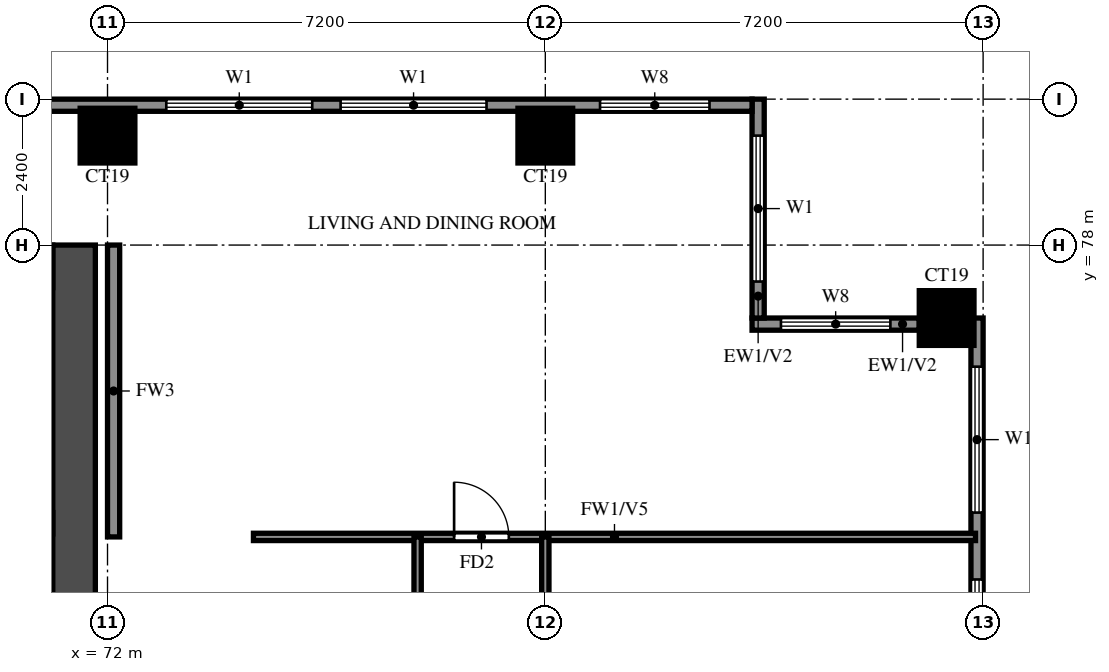
"""IFC4 building model, lengths in metres.
Left out: names, types, materials, properties, quantities, classifications, styles, units other than length and angle.
Written with IfcOpenShell. Run it as: python <this file> out.ifc"""

import sys

from ifc_helpers import new_model, si_unit, direction, frame, frame_2d, origin, origin_2d, place, context, subcontext, project, spatial, rectangle, extrude, source, transform, mapped, element, fill, save


model = new_model("IFC4")
c1 = context("Model", 3, precision=1e-05, world=origin(), true_north=direction((0.0, 1.0)))
c2 = subcontext(c1, "Body", "Model", "MODEL_VIEW")
j1 = project(units=[si_unit("LENGTHUNIT", "METRE"), si_unit("PLANEANGLEUNIT", "RADIAN")], contexts=[c1])
p1 = place(None, origin())
s1 = spatial("IfcSite", under=j1, at=p1, CompositionType="ELEMENT")
p2 = place(p1, origin())
s2 = spatial("IfcBuilding", under=s1, at=p2, CompositionType="ELEMENT")
p3 = place(p2, frame((0.0, 0.0, 123.5)))
s3 = spatial("IfcBuildingStorey", under=s2, at=p3, CompositionType="ELEMENT", Elevation=123.5)
m1 = source(origin(), c2, "Body", "SweptSolid", [
    extrude(rectangle(XDim=0.9, YDim=0.9, at=origin_2d()), origin(), (0.0, 0.0, 1.0), 3.2),
])
for number, where, z_axis, x_axis in (
    (1, (85.8, 76.8, 0.0), (0.0, 0.0, 1.0), (1.0, 0.0, 0.0)),
    (2, (72.0, 79.8, 0.0), (0.0, 0.0, 1.0), (1.0, 0.0, 0.0)),
    (3, (79.2, 79.8, 0.0), (0.0, 0.0, 1.0), (1.0, 0.0, 0.0)),
):
    element("IfcColumn", number, at=place(p3, frame(where, z_axis=z_axis, x_axis=x_axis)), inside=s3, PredefinedType="COLUMN", context=c2, shape_type="MappedRepresentation", body=[
        mapped(m1, transform((0.0, 0.0, 0.0))),
    ])
p4 = place(p3, frame((71.45, 66.1, 0.0), z_axis=(0.0, 0.0, 1.0), x_axis=(0.0, 1.0, 0.0)))
e4 = element("IfcWall", 4, at=p4, inside=s3, PredefinedType="SHEAR", context=c2, shape_type="SweptSolid", body=[
    extrude(rectangle(XDim=11.9, YDim=0.7, at=frame_2d((5.95, 0.0))), origin(), (0.0, 0.0, 1.0), 3.2),
])
p5 = place(p3, frame((29.7, 77.65, 0.0), z_axis=(0.0, 0.0, 1.0), x_axis=(1.0, 0.0, 0.0)))
e5 = element("IfcWall", 5, at=p5, inside=s3, PredefinedType="SHEAR", context=c2, shape_type="SweptSolid", body=[
    extrude(rectangle(XDim=41.4, YDim=0.7, at=frame_2d((20.7, 0.0))), origin(), (0.0, 0.0, 1.0), 3.2),
])
p6 = place(p3, frame((86.3, 62.4, 0.0), z_axis=(0.0, 0.0, 1.0), x_axis=(0.0, 1.0, 0.0)))
e6 = element("IfcWall", 6, at=p6, inside=s3, PredefinedType="SOLIDWALL", context=c2, shape_type="SweptSolid", body=[
    extrude(rectangle(XDim=14.4, YDim=0.2, at=frame_2d((7.2, 0.0))), origin(), (0.0, 0.0, 1.0), 3.2),
])
p7 = place(p6, frame((1.1, 0.0, 0.6)))
e7 = element("IfcOpeningElement", 7, at=p7, cuts=e6, PredefinedType="OPENING", context=c2, shape_type="SweptSolid", body=[
    extrude(rectangle(XDim=1.8, YDim=2.4, at=frame_2d((0.9, 1.2))), frame((0.0, 0.11, 0.0), z_axis=(0.0, -1.0, 0.0), x_axis=(1.0, 0.0, 0.0)), (0.0, 0.0, 1.0), 0.22),
])
p8 = place(p6, frame((4.0, 0.0, 0.6)))
e8 = element("IfcOpeningElement", 8, at=p8, cuts=e6, PredefinedType="OPENING", context=c2, shape_type="SweptSolid", body=[
    extrude(rectangle(XDim=2.4, YDim=2.4, at=frame_2d((1.2, 1.2))), frame((0.0, 0.11, 0.0), z_axis=(0.0, -1.0, 0.0), x_axis=(1.0, 0.0, 0.0)), (0.0, 0.0, 1.0), 0.22),
])
p9 = place(p6, frame((8.3, 0.0, 0.6)))
e9 = element("IfcOpeningElement", 9, at=p9, cuts=e6, PredefinedType="OPENING", context=c2, shape_type="SweptSolid", body=[
    extrude(rectangle(XDim=1.8, YDim=2.4, at=frame_2d((0.9, 1.2))), frame((0.0, 0.11, 0.0), z_axis=(0.0, -1.0, 0.0), x_axis=(1.0, 0.0, 0.0)), (0.0, 0.0, 1.0), 0.22),
])
p10 = place(p6, frame((11.2, 0.0, 0.6)))
e10 = element("IfcOpeningElement", 10, at=p10, cuts=e6, PredefinedType="OPENING", context=c2, shape_type="SweptSolid", body=[
    extrude(rectangle(XDim=2.4, YDim=2.4, at=frame_2d((1.2, 1.2))), frame((0.0, 0.11, 0.0), z_axis=(0.0, -1.0, 0.0), x_axis=(1.0, 0.0, 0.0)), (0.0, 0.0, 1.0), 0.22),
])
p11 = place(p3, frame((85.35, 76.7, 0.0), z_axis=(0.0, 0.0, 1.0), x_axis=(-1.0, 0.0, 0.0)))
e11 = element("IfcWall", 11, at=p11, inside=s3, PredefinedType="SOLIDWALL", context=c2, shape_type="SweptSolid", body=[
    extrude(rectangle(XDim=2.75, YDim=0.2, at=frame_2d((1.375, 0.0))), origin(), (0.0, 0.0, 1.0), 3.2),
])
p12 = place(p11, frame((0.475, 0.0, 0.6)))
e12 = element("IfcOpeningElement", 12, at=p12, cuts=e11, PredefinedType="OPENING", context=c2, shape_type="SweptSolid", body=[
    extrude(rectangle(XDim=1.8, YDim=2.4, at=frame_2d((0.9, 1.2))), frame((0.0, 0.11, 0.0), z_axis=(0.0, -1.0, 0.0), x_axis=(1.0, 0.0, 0.0)), (0.0, 0.0, 1.0), 0.22),
])
p13 = place(p3, frame((82.7, 76.8, 0.0), z_axis=(0.0, 0.0, 1.0), x_axis=(0.0, 1.0, 0.0)))
e13 = element("IfcWall", 13, at=p13, inside=s3, PredefinedType="SOLIDWALL", context=c2, shape_type="SweptSolid", body=[
    extrude(rectangle(XDim=3.6, YDim=0.2, at=frame_2d((1.8, 0.0))), origin(), (0.0, 0.0, 1.0), 3.2),
])
p14 = place(p13, frame((0.6, 0.0, 0.6)))
e14 = element("IfcOpeningElement", 14, at=p14, cuts=e13, PredefinedType="OPENING", context=c2, shape_type="SweptSolid", body=[
    extrude(rectangle(XDim=2.4, YDim=2.4, at=frame_2d((1.2, 1.2))), frame((0.0, 0.11, 0.0), z_axis=(0.0, -1.0, 0.0), x_axis=(1.0, 0.0, 0.0)), (0.0, 0.0, 1.0), 0.22),
])
p15 = place(p3, frame((82.6, 80.3, 0.0), z_axis=(0.0, 0.0, 1.0), x_axis=(-1.0, 0.0, 0.0)))
e15 = element("IfcWall", 15, at=p15, inside=s3, PredefinedType="SOLIDWALL", context=c2, shape_type="SweptSolid", body=[
    extrude(rectangle(XDim=64.6, YDim=0.2, at=frame_2d((32.3, 0.0))), origin(), (0.0, 0.0, 1.0), 3.2),
])
p16 = place(p15, frame((54.7, 0.0, 0.0)))
e16 = element("IfcOpeningElement", 16, at=p16, cuts=e15, PredefinedType="OPENING", context=c2, shape_type="SweptSolid", body=[
    extrude(rectangle(XDim=1.8, YDim=2.4, at=frame_2d((0.9, 1.2))), frame((0.0, 0.11, 0.0), z_axis=(0.0, -1.0, 0.0), x_axis=(1.0, 0.0, 0.0)), (0.0, 0.0, 1.0), 0.22),
])
p17 = place(p15, frame((56.95, 0.0, 0.6)))
e17 = element("IfcOpeningElement", 17, at=p17, cuts=e15, PredefinedType="OPENING", context=c2, shape_type="SweptSolid", body=[
    extrude(rectangle(XDim=0.9, YDim=2.4, at=frame_2d((0.45, 1.2))), frame((0.0, 0.11, 0.0), z_axis=(0.0, -1.0, 0.0), x_axis=(1.0, 0.0, 0.0)), (0.0, 0.0, 1.0), 0.22),
])
p18 = place(p15, frame((58.7, 0.0, 0.6)))
e18 = element("IfcOpeningElement", 18, at=p18, cuts=e15, PredefinedType="OPENING", context=c2, shape_type="SweptSolid", body=[
    extrude(rectangle(XDim=1.8, YDim=2.4, at=frame_2d((0.9, 1.2))), frame((0.0, 0.11, 0.0), z_axis=(0.0, -1.0, 0.0), x_axis=(1.0, 0.0, 0.0)), (0.0, 0.0, 1.0), 0.22),
])
p19 = place(p15, frame((62.0, 0.0, 0.6)))
e19 = element("IfcOpeningElement", 19, at=p19, cuts=e15, PredefinedType="OPENING", context=c2, shape_type="SweptSolid", body=[
    extrude(rectangle(XDim=1.8, YDim=2.4, at=frame_2d((0.9, 1.2))), frame((0.0, 0.11, 0.0), z_axis=(0.0, -1.0, 0.0), x_axis=(1.0, 0.0, 0.0)), (0.0, 0.0, 1.0), 0.22),
])
p20 = place(p15, frame((0.7, 0.0, 0.6)))
e20 = element("IfcOpeningElement", 20, at=p20, cuts=e15, PredefinedType="OPENING", context=c2, shape_type="SweptSolid", body=[
    extrude(rectangle(XDim=1.8, YDim=2.4, at=frame_2d((0.9, 1.2))), frame((0.0, 0.11, 0.0), z_axis=(0.0, -1.0, 0.0), x_axis=(1.0, 0.0, 0.0)), (0.0, 0.0, 1.0), 0.22),
])
p21 = place(p15, frame((4.367, 0.0, 0.6)))
e21 = element("IfcOpeningElement", 21, at=p21, cuts=e15, PredefinedType="OPENING", context=c2, shape_type="SweptSolid", body=[
    extrude(rectangle(XDim=2.4, YDim=2.4, at=frame_2d((1.2, 1.2))), frame((0.0, 0.11, 0.0), z_axis=(0.0, -1.0, 0.0), x_axis=(1.0, 0.0, 0.0)), (0.0, 0.0, 1.0), 0.22),
])
p22 = place(p15, frame((7.233, 0.0, 0.6)))
e22 = element("IfcOpeningElement", 22, at=p22, cuts=e15, PredefinedType="OPENING", context=c2, shape_type="SweptSolid", body=[
    extrude(rectangle(XDim=2.4, YDim=2.4, at=frame_2d((1.2, 1.2))), frame((0.0, 0.11, 0.0), z_axis=(0.0, -1.0, 0.0), x_axis=(1.0, 0.0, 0.0)), (0.0, 0.0, 1.0), 0.22),
])
p23 = place(p3, frame((72.1, 73.2, 0.0), z_axis=(0.0, 0.0, 1.0), x_axis=(0.0, 1.0, 0.0)))
e23 = element("IfcWall", 23, at=p23, inside=s3, PredefinedType="SOLIDWALL", context=c2, shape_type="SweptSolid", body=[
    extrude(rectangle(XDim=4.8, YDim=0.2, at=frame_2d((2.4, 0.0))), origin(), (0.0, 0.0, 1.0), 3.2),
])
p24 = place(p3, frame((74.4, 73.2, 0.0), z_axis=(0.0, 0.0, 1.0), x_axis=(1.0, 0.0, 0.0)))
e24 = element("IfcWall", 24, at=p24, inside=s3, PredefinedType="PARTITIONING", context=c2, shape_type="SweptSolid", body=[
    extrude(rectangle(XDim=11.875, YDim=0.12, at=frame_2d((5.938, 0.0))), origin(), (0.0, 0.0, 1.0), 2.3),
])
p25 = place(p24, frame((3.3, 0.0, 0.0)))
e25 = element("IfcOpeningElement", 25, at=p25, cuts=e24, PredefinedType="OPENING", context=c2, shape_type="SweptSolid", body=[
    extrude(rectangle(XDim=0.9, YDim=2.1, at=frame_2d((0.45, 1.05))), frame((0.0, 0.07, 0.0), z_axis=(0.0, -1.0, 0.0), x_axis=(1.0, 0.0, 0.0)), (0.0, 0.0, 1.0), 0.14),
])
p26 = place(p3, frame((77.1, 61.2, 0.0), z_axis=(0.0, 0.0, 1.0), x_axis=(0.0, 1.0, 0.0)))
e26 = element("IfcWall", 26, at=p26, inside=s3, PredefinedType="PARTITIONING", context=c2, shape_type="SweptSolid", body=[
    extrude(rectangle(XDim=12.0, YDim=0.12, at=frame_2d((6.0, 0.0))), origin(), (0.0, 0.0, 1.0), 3.2),
])
p27 = place(p26, frame((1.875, 0.0, 0.0)))
e27 = element("IfcOpeningElement", 27, at=p27, cuts=e26, PredefinedType="OPENING", context=c2, shape_type="SweptSolid", body=[
    extrude(rectangle(XDim=0.9, YDim=2.1, at=frame_2d((0.45, 1.05))), frame((0.0, 0.07, 0.0), z_axis=(0.0, -1.0, 0.0), x_axis=(1.0, 0.0, 0.0)), (0.0, 0.0, 1.0), 0.14),
])
p28 = place(p26, frame((5.5, 0.0, 0.0)))
e28 = element("IfcOpeningElement", 28, at=p28, cuts=e26, PredefinedType="OPENING", context=c2, shape_type="SweptSolid", body=[
    extrude(rectangle(XDim=0.8, YDim=2.1, at=frame_2d((0.4, 1.05))), frame((0.0, 0.07, 0.0), z_axis=(0.0, -1.0, 0.0), x_axis=(1.0, 0.0, 0.0)), (0.0, 0.0, 1.0), 0.14),
])
p29 = place(p26, frame((9.125, 0.0, 0.0)))
e29 = element("IfcOpeningElement", 29, at=p29, cuts=e26, PredefinedType="OPENING", context=c2, shape_type="SweptSolid", body=[
    extrude(rectangle(XDim=0.9, YDim=2.1, at=frame_2d((0.45, 1.05))), frame((0.0, 0.07, 0.0), z_axis=(0.0, -1.0, 0.0), x_axis=(1.0, 0.0, 0.0)), (0.0, 0.0, 1.0), 0.14),
])
p30 = place(p3, frame((79.2, 48.125, 0.0), z_axis=(0.0, 0.0, 1.0), x_axis=(0.0, 1.0, 0.0)))
e30 = element("IfcWall", 30, at=p30, inside=s3, PredefinedType="PARTITIONING", context=c2, shape_type="SweptSolid", body=[
    extrude(rectangle(XDim=25.075, YDim=0.12, at=frame_2d((12.538, 0.0))), origin(), (0.0, 0.0, 1.0), 3.2),
])
p31 = place(p30, frame((2.788, 0.0, 0.0)))
e31 = element("IfcOpeningElement", 31, at=p31, cuts=e30, PredefinedType="OPENING", context=c2, shape_type="SweptSolid", body=[
    extrude(rectangle(XDim=1.5, YDim=2.1, at=frame_2d((0.75, 1.05))), frame((0.0, 0.07, 0.0), z_axis=(0.0, -1.0, 0.0), x_axis=(1.0, 0.0, 0.0)), (0.0, 0.0, 1.0), 0.14),
])
p32 = place(p30, frame((8.425, 0.0, 0.0)))
e32 = element("IfcOpeningElement", 32, at=p32, cuts=e30, PredefinedType="OPENING", context=c2, shape_type="SweptSolid", body=[
    extrude(rectangle(XDim=0.9, YDim=2.1, at=frame_2d((0.45, 1.05))), frame((0.0, 0.07, 0.0), z_axis=(0.0, -1.0, 0.0), x_axis=(1.0, 0.0, 0.0)), (0.0, 0.0, 1.0), 0.14),
])
p33 = place(p30, frame((12.025, 0.0, 0.0)))
e33 = element("IfcOpeningElement", 33, at=p33, cuts=e30, PredefinedType="OPENING", context=c2, shape_type="SweptSolid", body=[
    extrude(rectangle(XDim=0.9, YDim=2.1, at=frame_2d((0.45, 1.05))), frame((0.0, 0.07, 0.0), z_axis=(0.0, -1.0, 0.0), x_axis=(1.0, 0.0, 0.0)), (0.0, 0.0, 1.0), 0.14),
])
p34 = place(p30, frame((15.625, 0.0, 0.0)))
e34 = element("IfcOpeningElement", 34, at=p34, cuts=e30, PredefinedType="OPENING", context=c2, shape_type="SweptSolid", body=[
    extrude(rectangle(XDim=0.9, YDim=2.1, at=frame_2d((0.45, 1.05))), frame((0.0, 0.07, 0.0), z_axis=(0.0, -1.0, 0.0), x_axis=(1.0, 0.0, 0.0)), (0.0, 0.0, 1.0), 0.14),
])
p35 = place(p30, frame((19.225, 0.0, 0.0)))
e35 = element("IfcOpeningElement", 35, at=p35, cuts=e30, PredefinedType="OPENING", context=c2, shape_type="SweptSolid", body=[
    extrude(rectangle(XDim=0.9, YDim=2.1, at=frame_2d((0.45, 1.05))), frame((0.0, 0.07, 0.0), z_axis=(0.0, -1.0, 0.0), x_axis=(1.0, 0.0, 0.0)), (0.0, 0.0, 1.0), 0.14),
])
p36 = place(p30, frame((22.825, 0.0, 0.0)))
e36 = element("IfcOpeningElement", 36, at=p36, cuts=e30, PredefinedType="OPENING", context=c2, shape_type="SweptSolid", body=[
    extrude(rectangle(XDim=0.9, YDim=2.1, at=frame_2d((0.45, 1.05))), frame((0.0, 0.07, 0.0), z_axis=(0.0, -1.0, 0.0), x_axis=(1.0, 0.0, 0.0)), (0.0, 0.0, 1.0), 0.14),
])
p37 = place(p9, origin())
e37 = element("IfcWindow", 37, at=p37, inside=s3, PartitioningType="DOUBLE_PANEL_VERTICAL", PredefinedType="WINDOW", context=c2, shape_type="SweptSolid", body=[
    extrude(rectangle(XDim=1.8, YDim=2.4, at=frame_2d((0.9, 1.2))), frame((0.0, 0.03, 0.0), z_axis=(0.0, -1.0, 0.0), x_axis=(1.0, 0.0, 0.0)), (0.0, 0.0, 1.0), 0.06),
])
fill(e9, e37)
p38 = place(p10, origin())
e38 = element("IfcWindow", 38, at=p38, inside=s3, PartitioningType="DOUBLE_PANEL_VERTICAL", PredefinedType="WINDOW", context=c2, shape_type="SweptSolid", body=[
    extrude(rectangle(XDim=2.4, YDim=2.4, at=frame_2d((1.2, 1.2))), frame((0.0, 0.03, 0.0), z_axis=(0.0, -1.0, 0.0), x_axis=(1.0, 0.0, 0.0)), (0.0, 0.0, 1.0), 0.06),
])
fill(e10, e38)
p39 = place(p12, origin())
e39 = element("IfcWindow", 39, at=p39, inside=s3, PartitioningType="DOUBLE_PANEL_VERTICAL", PredefinedType="WINDOW", context=c2, shape_type="SweptSolid", body=[
    extrude(rectangle(XDim=1.8, YDim=2.4, at=frame_2d((0.9, 1.2))), frame((0.0, 0.03, 0.0), z_axis=(0.0, -1.0, 0.0), x_axis=(1.0, 0.0, 0.0)), (0.0, 0.0, 1.0), 0.06),
])
fill(e12, e39)
p40 = place(p14, origin())
e40 = element("IfcWindow", 40, at=p40, inside=s3, PartitioningType="DOUBLE_PANEL_VERTICAL", PredefinedType="WINDOW", context=c2, shape_type="SweptSolid", body=[
    extrude(rectangle(XDim=2.4, YDim=2.4, at=frame_2d((1.2, 1.2))), frame((0.0, 0.03, 0.0), z_axis=(0.0, -1.0, 0.0), x_axis=(1.0, 0.0, 0.0)), (0.0, 0.0, 1.0), 0.06),
])
fill(e14, e40)
p41 = place(p20, origin())
e41 = element("IfcWindow", 41, at=p41, inside=s3, PartitioningType="DOUBLE_PANEL_VERTICAL", PredefinedType="WINDOW", context=c2, shape_type="SweptSolid", body=[
    extrude(rectangle(XDim=1.8, YDim=2.4, at=frame_2d((0.9, 1.2))), frame((0.0, 0.03, 0.0), z_axis=(0.0, -1.0, 0.0), x_axis=(1.0, 0.0, 0.0)), (0.0, 0.0, 1.0), 0.06),
])
fill(e20, e41)
p42 = place(p21, origin())
e42 = element("IfcWindow", 42, at=p42, inside=s3, PartitioningType="DOUBLE_PANEL_VERTICAL", PredefinedType="WINDOW", context=c2, shape_type="SweptSolid", body=[
    extrude(rectangle(XDim=2.4, YDim=2.4, at=frame_2d((1.2, 1.2))), frame((0.0, 0.03, 0.0), z_axis=(0.0, -1.0, 0.0), x_axis=(1.0, 0.0, 0.0)), (0.0, 0.0, 1.0), 0.06),
])
fill(e21, e42)
p43 = place(p22, origin())
e43 = element("IfcWindow", 43, at=p43, inside=s3, PartitioningType="DOUBLE_PANEL_VERTICAL", PredefinedType="WINDOW", context=c2, shape_type="SweptSolid", body=[
    extrude(rectangle(XDim=2.4, YDim=2.4, at=frame_2d((1.2, 1.2))), frame((0.0, 0.03, 0.0), z_axis=(0.0, -1.0, 0.0), x_axis=(1.0, 0.0, 0.0)), (0.0, 0.0, 1.0), 0.06),
])
fill(e22, e43)
p44 = place(p25, origin())
e44 = element("IfcDoor", 44, at=p44, inside=s3, OperationType="SINGLE_SWING_LEFT", PredefinedType="DOOR", context=c2, shape_type="SweptSolid", body=[
    extrude(rectangle(XDim=0.9, YDim=2.1, at=frame_2d((0.45, 1.05))), frame((0.0, 0.025, 0.0), z_axis=(0.0, -1.0, 0.0), x_axis=(1.0, 0.0, 0.0)), (0.0, 0.0, 1.0), 0.05),
])
fill(e25, e44)
save(model, sys.argv[1])
